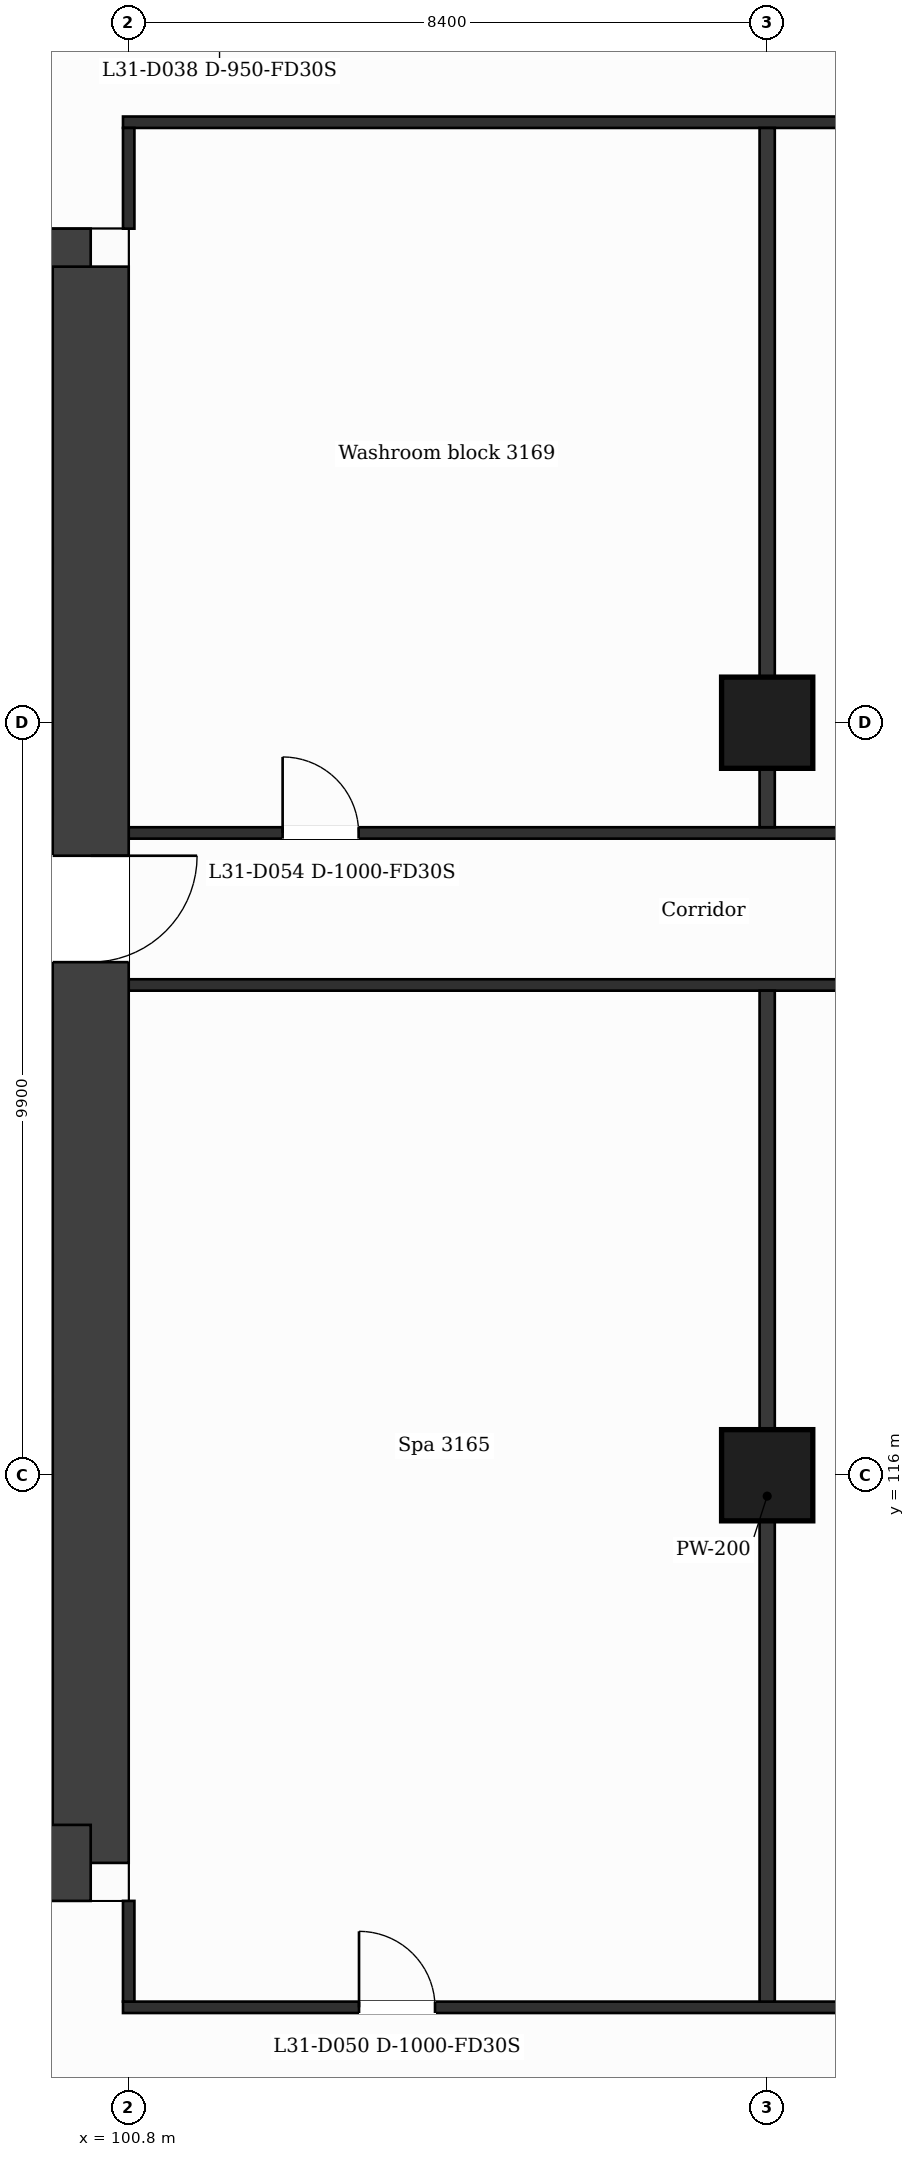
"""IFC4 building model, lengths in metres.
Left out: names, types, materials, properties, quantities, classifications, styles, units other than length and angle.
Written with IfcOpenShell. Run it as: python <this file> out.ifc"""

import sys

from ifc_helpers import new_model, si_unit, direction, frame, frame_2d, origin, origin_2d, place, context, subcontext, project, spatial, rectangle, extrude, element, fill, save


model = new_model("IFC4")
c1 = context("Model", 3, precision=1e-05, world=origin(), true_north=direction((0.0, 1.0)))
c2 = subcontext(c1, "Body", "Model", "MODEL_VIEW")
j1 = project(units=[si_unit("LENGTHUNIT", "METRE"), si_unit("PLANEANGLEUNIT", "RADIAN")], contexts=[c1])
p1 = place(None, origin())
s1 = spatial("IfcSite", under=j1, at=p1, CompositionType="ELEMENT")
p2 = place(p1, origin())
s2 = spatial("IfcBuilding", under=s1, at=p2, CompositionType="ELEMENT")
p3 = place(p2, frame((0.0, 0.0, 131.7)))
s3 = spatial("IfcBuildingStorey", under=s2, at=p3, CompositionType="ELEMENT", Elevation=131.7)
p4 = place(p3, frame((89.068, 131.9, 0.0), z_axis=(0.0, 0.0, 1.0), x_axis=(1.0, 0.0, 0.0)))
e1 = element("IfcWall", 1, at=p4, inside=s3, PredefinedType="SHEAR", context=c2, shape_type="SweptSolid", body=[
    extrude(rectangle(XDim=11.232, YDim=1.0, at=frame_2d((5.616, 0.0))), origin(), (0.0, 0.0, 1.0), 3.7),
])
p5 = place(p4, frame((6.646, 0.0, 0.0)))
e2 = element("IfcOpeningElement", 2, at=p5, cuts=e1, PredefinedType="OPENING", context=c2, shape_type="SweptSolid", body=[
    extrude(rectangle(XDim=1.2, YDim=2.1, at=frame_2d((0.6, 1.05))), frame((0.0, 0.51, 0.0), z_axis=(0.0, -1.0, 0.0), x_axis=(1.0, 0.0, 0.0)), (0.0, 0.0, 1.0), 1.02),
])
p6 = place(p3, frame((100.3, 131.9, 0.0), z_axis=(0.0, 0.0, 1.0), x_axis=(0.0, -1.0, 0.0)))
e3 = element("IfcWall", 3, at=p6, inside=s3, PredefinedType="SHEAR", context=c2, shape_type="SweptSolid", body=[
    extrude(rectangle(XDim=21.0, YDim=1.0, at=frame_2d((10.5, 0.0))), origin(), (0.0, 0.0, 1.0), 3.7),
])
p7 = place(p6, frame((7.75, 0.0, 0.0)))
e4 = element("IfcOpeningElement", 4, at=p7, cuts=e3, PredefinedType="OPENING", context=c2, shape_type="SweptSolid", body=[
    extrude(rectangle(XDim=1.4, YDim=2.1, at=frame_2d((0.7, 1.05))), frame((0.0, 0.51, 0.0), z_axis=(0.0, -1.0, 0.0), x_axis=(1.0, 0.0, 0.0)), (0.0, 0.0, 1.0), 1.02),
])
p8 = place(p3, frame((100.3, 110.9, 0.0), z_axis=(0.0, 0.0, 1.0), x_axis=(-1.0, 0.0, 0.0)))
e5 = element("IfcWall", 5, at=p8, inside=s3, PredefinedType="SHEAR", context=c2, shape_type="SweptSolid", body=[
    extrude(rectangle(XDim=14.059, YDim=1.0, at=frame_2d((7.03, 0.0))), origin(), (0.0, 0.0, 1.0), 3.7),
])
p9 = place(p8, frame((5.802, 0.0, 0.0)))
e6 = element("IfcOpeningElement", 6, at=p9, cuts=e5, PredefinedType="OPENING", context=c2, shape_type="SweptSolid", body=[
    extrude(rectangle(XDim=1.4, YDim=2.1, at=frame_2d((0.7, 1.05))), frame((0.0, 0.51, 0.0), z_axis=(0.0, -1.0, 0.0), x_axis=(1.0, 0.0, 0.0)), (0.0, 0.0, 1.0), 1.02),
])
p10 = place(p3, frame((94.9, 116.5, 0.0), z_axis=(0.0, 0.0, 1.0), x_axis=(1.0, 0.0, 0.0)))
e7 = element("IfcWall", 7, at=p10, inside=s3, PredefinedType="SHEAR", context=c2, shape_type="SweptSolid", body=[
    extrude(rectangle(XDim=4.9, YDim=1.0, at=frame_2d((2.45, 0.0))), origin(), (0.0, 0.0, 1.0), 3.7),
])
for number, where, z_axis, x_axis in (
    (8, (109.2, 116.0, 0.0), (0.0, 0.0, 1.0), (1.0, 0.0, 0.0)),
    (9, (109.2, 125.9, 0.0), (0.0, 0.0, 1.0), (1.0, 0.0, 0.0)),
):
    element("IfcColumn", number, at=place(p3, frame(where, z_axis=z_axis, x_axis=x_axis)), inside=s3, PredefinedType="COLUMN", context=c2, shape_type="SweptSolid", body=[
        extrude(rectangle(XDim=1.2, YDim=1.2, at=origin_2d()), origin(), (0.0, 0.0, 1.0), 3.7),
    ])
p11 = place(p3, frame((100.725, 109.0, 0.0), z_axis=(0.0, 0.0, 1.0), x_axis=(1.0, 0.0, 0.0)))
e10 = element("IfcWall", 10, at=p11, inside=s3, PredefinedType="PARTITIONING", context=c2, shape_type="SweptSolid", body=[
    extrude(rectangle(XDim=25.35, YDim=0.15, at=frame_2d((12.675, 0.0))), origin(), (0.0, 0.0, 1.0), 3.2),
])
p12 = place(p11, frame((3.105, 0.0, 0.0)))
e11 = element("IfcOpeningElement", 11, at=p12, cuts=e10, PredefinedType="OPENING", context=c2, shape_type="SweptSolid", body=[
    extrude(rectangle(XDim=1.0, YDim=2.1, at=frame_2d((0.5, 1.05))), frame((0.0, 0.085, 0.0), z_axis=(0.0, -1.0, 0.0), x_axis=(1.0, 0.0, 0.0)), (0.0, 0.0, 1.0), 0.17),
])
p13 = place(p11, frame((13.85, 0.0, 0.0)))
e12 = element("IfcOpeningElement", 12, at=p13, cuts=e10, PredefinedType="OPENING", context=c2, shape_type="SweptSolid", body=[
    extrude(rectangle(XDim=1.0, YDim=2.1, at=frame_2d((0.5, 1.05))), frame((0.0, 0.085, 0.0), z_axis=(0.0, -1.0, 0.0), x_axis=(1.0, 0.0, 0.0)), (0.0, 0.0, 1.0), 0.17),
])
p14 = place(p11, frame((18.475, 0.0, 0.0)))
e13 = element("IfcOpeningElement", 13, at=p14, cuts=e10, PredefinedType="OPENING", context=c2, shape_type="SweptSolid", body=[
    extrude(rectangle(XDim=1.0, YDim=2.1, at=frame_2d((0.5, 1.05))), frame((0.0, 0.085, 0.0), z_axis=(0.0, -1.0, 0.0), x_axis=(1.0, 0.0, 0.0)), (0.0, 0.0, 1.0), 0.17),
])
p15 = place(p11, frame((22.925, 0.0, 0.0)))
e14 = element("IfcOpeningElement", 14, at=p15, cuts=e10, PredefinedType="OPENING", context=c2, shape_type="SweptSolid", body=[
    extrude(rectangle(XDim=1.0, YDim=2.1, at=frame_2d((0.5, 1.05))), frame((0.0, 0.085, 0.0), z_axis=(0.0, -1.0, 0.0), x_axis=(1.0, 0.0, 0.0)), (0.0, 0.0, 1.0), 0.17),
])
for number, where, z_axis, x_axis in (
    (15, (95.227, 117.2, 0.0), (0.0, 0.0, 1.0), (1.0, 0.0, 0.0)),
    (16, (95.227, 118.8, 0.0), (0.0, 0.0, 1.0), (1.0, 0.0, 0.0)),
):
    element("IfcWall", number, at=place(p3, frame(where, z_axis=z_axis, x_axis=x_axis)), inside=s3, PredefinedType="PARTITIONING", context=c2, shape_type="SweptSolid", body=[
        extrude(rectangle(XDim=4.573, YDim=0.2, at=frame_2d((2.287, 0.0))), origin(), (0.0, 0.0, 1.0), 3.2),
    ])
p16 = place(p3, frame((95.227, 122.1, 0.0), z_axis=(0.0, 0.0, 1.0), x_axis=(1.0, 0.0, 0.0)))
e17 = element("IfcWall", 17, at=p16, inside=s3, PredefinedType="PARTITIONING", context=c2, shape_type="SweptSolid", body=[
    extrude(rectangle(XDim=4.573, YDim=0.2, at=frame_2d((2.287, 0.0))), origin(), (0.0, 0.0, 1.0), 3.2),
])
p17 = place(p16, frame((0.865, 0.0, 0.0)))
e18 = element("IfcOpeningElement", 18, at=p17, cuts=e17, PredefinedType="OPENING", context=c2, shape_type="SweptSolid", body=[
    extrude(rectangle(XDim=0.9, YDim=2.1, at=frame_2d((0.45, 1.05))), frame((0.0, 0.11, 0.0), z_axis=(0.0, -1.0, 0.0), x_axis=(1.0, 0.0, 0.0)), (0.0, 0.0, 1.0), 0.22),
])
p18 = place(p16, frame((2.911, 0.0, 0.0)))
e19 = element("IfcOpeningElement", 19, at=p18, cuts=e17, PredefinedType="OPENING", context=c2, shape_type="SweptSolid", body=[
    extrude(rectangle(XDim=0.9, YDim=2.1, at=frame_2d((0.45, 1.05))), frame((0.0, 0.11, 0.0), z_axis=(0.0, -1.0, 0.0), x_axis=(1.0, 0.0, 0.0)), (0.0, 0.0, 1.0), 0.22),
])
p19 = place(p3, frame((100.8, 122.45, 0.0), z_axis=(0.0, 0.0, 1.0), x_axis=(1.0, 0.0, 0.0)))
e20 = element("IfcWall", 20, at=p19, inside=s3, PredefinedType="PARTITIONING", context=c2, shape_type="SweptSolid", body=[
    extrude(rectangle(XDim=25.2, YDim=0.15, at=frame_2d((12.6, 0.0))), origin(), (0.0, 0.0, 1.0), 3.2),
])
p20 = place(p3, frame((100.8, 124.45, 0.0), z_axis=(0.0, 0.0, 1.0), x_axis=(1.0, 0.0, 0.0)))
e21 = element("IfcWall", 21, at=p20, inside=s3, PredefinedType="PARTITIONING", context=c2, shape_type="SweptSolid", body=[
    extrude(rectangle(XDim=25.2, YDim=0.15, at=frame_2d((12.6, 0.0))), origin(), (0.0, 0.0, 1.0), 3.2),
])
p21 = place(p20, frame((2.025, 0.0, 0.0)))
e22 = element("IfcOpeningElement", 22, at=p21, cuts=e21, PredefinedType="OPENING", context=c2, shape_type="SweptSolid", body=[
    extrude(rectangle(XDim=1.0, YDim=2.1, at=frame_2d((0.5, 1.05))), frame((0.0, 0.085, 0.0), z_axis=(0.0, -1.0, 0.0), x_axis=(1.0, 0.0, 0.0)), (0.0, 0.0, 1.0), 0.17),
])
p22 = place(p20, frame((12.1, 0.0, 0.0)))
e23 = element("IfcOpeningElement", 23, at=p22, cuts=e21, PredefinedType="OPENING", context=c2, shape_type="SweptSolid", body=[
    extrude(rectangle(XDim=1.0, YDim=2.1, at=frame_2d((0.5, 1.05))), frame((0.0, 0.085, 0.0), z_axis=(0.0, -1.0, 0.0), x_axis=(1.0, 0.0, 0.0)), (0.0, 0.0, 1.0), 0.17),
])
p23 = place(p20, frame((17.54, 0.0, 0.0)))
e24 = element("IfcOpeningElement", 24, at=p23, cuts=e21, PredefinedType="OPENING", context=c2, shape_type="SweptSolid", body=[
    extrude(rectangle(XDim=1.0, YDim=2.1, at=frame_2d((0.5, 1.05))), frame((0.0, 0.085, 0.0), z_axis=(0.0, -1.0, 0.0), x_axis=(1.0, 0.0, 0.0)), (0.0, 0.0, 1.0), 0.17),
])
p24 = place(p20, frame((22.85, 0.0, 0.0)))
e25 = element("IfcOpeningElement", 25, at=p24, cuts=e21, PredefinedType="OPENING", context=c2, shape_type="SweptSolid", body=[
    extrude(rectangle(XDim=1.0, YDim=2.1, at=frame_2d((0.5, 1.05))), frame((0.0, 0.085, 0.0), z_axis=(0.0, -1.0, 0.0), x_axis=(1.0, 0.0, 0.0)), (0.0, 0.0, 1.0), 0.17),
])
p25 = place(p3, frame((100.725, 133.8, 0.0), z_axis=(0.0, 0.0, 1.0), x_axis=(1.0, 0.0, 0.0)))
e26 = element("IfcWall", 26, at=p25, inside=s3, PredefinedType="PARTITIONING", context=c2, shape_type="SweptSolid", body=[
    extrude(rectangle(XDim=25.35, YDim=0.15, at=frame_2d((12.675, 0.0))), origin(), (0.0, 0.0, 1.0), 3.2),
])
p26 = place(p25, frame((17.85, 0.0, 0.0)))
e27 = element("IfcOpeningElement", 27, at=p26, cuts=e26, PredefinedType="OPENING", context=c2, shape_type="SweptSolid", body=[
    extrude(rectangle(XDim=1.0, YDim=2.1, at=frame_2d((0.5, 1.05))), frame((0.0, 0.085, 0.0), z_axis=(0.0, -1.0, 0.0), x_axis=(1.0, 0.0, 0.0)), (0.0, 0.0, 1.0), 0.17),
])
p27 = place(p3, frame((100.8, 109.075, 0.0), z_axis=(0.0, 0.0, 1.0), x_axis=(0.0, 1.0, 0.0)))
e28 = element("IfcWall", 28, at=p27, inside=s3, PredefinedType="PARTITIONING", context=c2, shape_type="SweptSolid", body=[
    extrude(rectangle(XDim=1.325, YDim=0.15, at=frame_2d((0.663, 0.0))), origin(), (0.0, 0.0, 1.0), 3.2),
])
p28 = place(p3, frame((100.8, 132.4, 0.0), z_axis=(0.0, 0.0, 1.0), x_axis=(0.0, 1.0, 0.0)))
e29 = element("IfcWall", 29, at=p28, inside=s3, PredefinedType="PARTITIONING", context=c2, shape_type="SweptSolid", body=[
    extrude(rectangle(XDim=1.325, YDim=0.15, at=frame_2d((0.663, 0.0))), origin(), (0.0, 0.0, 1.0), 3.2),
])
p29 = place(p3, frame((109.2, 109.075, 0.0), z_axis=(0.0, 0.0, 1.0), x_axis=(0.0, 1.0, 0.0)))
e30 = element("IfcWall", 30, at=p29, inside=s3, PredefinedType="PARTITIONING", context=c2, shape_type="SweptSolid", body=[
    extrude(rectangle(XDim=13.3, YDim=0.2, at=frame_2d((6.65, 0.0))), origin(), (0.0, 0.0, 1.0), 3.2),
])
p30 = place(p3, frame((109.2, 124.525, 0.0), z_axis=(0.0, 0.0, 1.0), x_axis=(0.0, 1.0, 0.0)))
e31 = element("IfcWall", 31, at=p30, inside=s3, PredefinedType="PARTITIONING", context=c2, shape_type="SweptSolid", body=[
    extrude(rectangle(XDim=9.2, YDim=0.2, at=frame_2d((4.6, 0.0))), origin(), (0.0, 0.0, 1.0), 3.2),
])
p31 = place(p12, origin())
e32 = element("IfcDoor", 32, at=p31, inside=s3, OperationType="SINGLE_SWING_LEFT", PredefinedType="DOOR", context=c2, shape_type="SweptSolid", body=[
    extrude(rectangle(XDim=1.0, YDim=2.1, at=frame_2d((0.5, 1.05))), frame((0.0, 0.025, 0.0), z_axis=(0.0, -1.0, 0.0), x_axis=(1.0, 0.0, 0.0)), (0.0, 0.0, 1.0), 0.05),
])
fill(e11, e32)
p32 = place(p21, origin())
e33 = element("IfcDoor", 33, at=p32, inside=s3, OperationType="SINGLE_SWING_LEFT", PredefinedType="DOOR", context=c2, shape_type="SweptSolid", body=[
    extrude(rectangle(XDim=1.0, YDim=2.1, at=frame_2d((0.5, 1.05))), frame((0.0, 0.025, 0.0), z_axis=(0.0, -1.0, 0.0), x_axis=(1.0, 0.0, 0.0)), (0.0, 0.0, 1.0), 0.05),
])
fill(e22, e33)
p33 = place(p7, origin())
e34 = element("IfcDoor", 34, at=p33, inside=s3, OperationType="SINGLE_SWING_LEFT", PredefinedType="DOOR", context=c2, shape_type="SweptSolid", body=[
    extrude(rectangle(XDim=1.4, YDim=2.1, at=frame_2d((0.7, 1.05))), frame((0.0, 0.025, 0.0), z_axis=(0.0, -1.0, 0.0), x_axis=(1.0, 0.0, 0.0)), (0.0, 0.0, 1.0), 0.05),
])
fill(e4, e34)
save(model, sys.argv[1])
